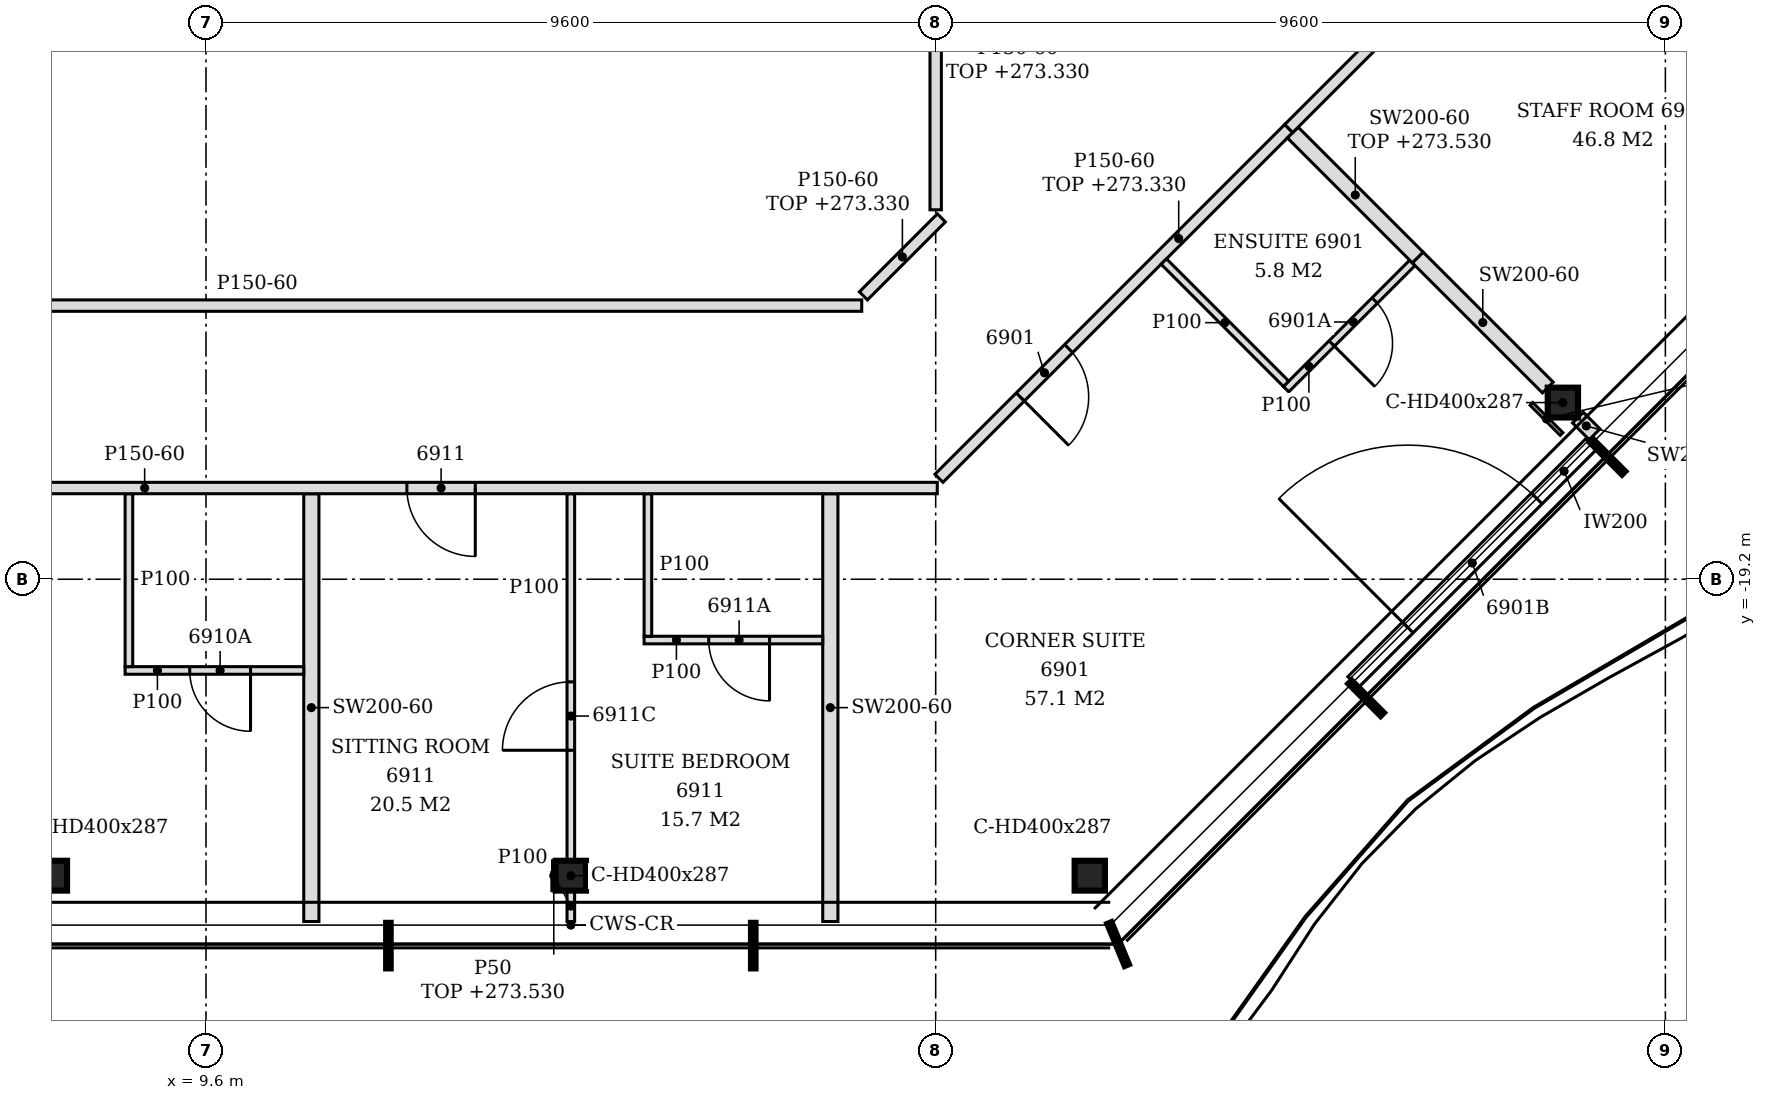
"""IFC4 building model, lengths in metres.
Left out: names, types, materials, properties, quantities, classifications, styles, units other than length and angle.
Written with IfcOpenShell. Run it as: python <this file> out.ifc"""

import sys

from ifc_helpers import new_model, si_unit, direction, frame, frame_2d, origin, origin_2d, place, context, subcontext, project, spatial, polyline, rectangle, i_section, outline, extrude, element, fill, save


model = new_model("IFC4")
c1 = context("Model", 3, precision=1e-05, world=origin(), true_north=direction((0.0, 1.0)))
c2 = subcontext(c1, "Body", "Model", "MODEL_VIEW")
j1 = project(units=[si_unit("LENGTHUNIT", "METRE"), si_unit("PLANEANGLEUNIT", "RADIAN")], contexts=[c1])
p1 = place(None, origin())
s1 = spatial("IfcSite", under=j1, at=p1, CompositionType="ELEMENT")
p2 = place(p1, origin())
s2 = spatial("IfcBuilding", under=s1, at=p2, CompositionType="ELEMENT")
p3 = place(p2, frame((0.0, 0.0, 270.6)))
s3 = spatial("IfcBuildingStorey", under=s2, at=p3, CompositionType="ELEMENT", Elevation=270.6)
for number, where, z_axis, x_axis in (
    (1, (7.573, -23.1, -0.15), (0.0, 0.0, 1.0), (1.0, 0.0, 0.0)),
    (2, (14.4, -23.1, -0.15), (0.0, 0.0, 1.0), (1.0, 0.0, 0.0)),
    (3, (21.227, -23.1, -0.15), (0.0, 0.0, 1.0), (1.0, 0.0, 0.0)),
    (4, (27.451, -16.876, -0.15), (0.0, 0.0, 1.0), (1.0, 0.0, 0.0)),
):
    element("IfcColumn", number, at=place(p3, frame(where, z_axis=z_axis, x_axis=x_axis)), inside=s3, PredefinedType="COLUMN", context=c2, shape_type="SweptSolid", body=[
        extrude(i_section(OverallWidth=0.399, OverallDepth=0.393, WebThickness=0.023, FlangeThickness=0.037, FilletRadius=0.015, at=origin_2d()), origin(), (0.0, 0.0, 1.0), 3.6),
    ])
p4 = place(p3, frame((24.693, -20.553, 0.0), z_axis=(0.0, 0.0, 1.0), x_axis=(0.707079231393, 0.707134329907, 0.0)))
e5 = element("IfcWall", 5, at=p4, inside=s3, PredefinedType="NOTDEFINED", context=c2, shape_type="SweptSolid", body=[
    extrude(rectangle(XDim=4.431, YDim=0.2, at=frame_2d((2.215, 0.0))), origin(), (0.0, 0.0, 1.0), 3.45),
])
p5 = place(p4, frame((1.015, 0.0, 0.0)))
e6 = element("IfcOpeningElement", 6, at=p5, cuts=e5, PredefinedType="OPENING", context=c2, shape_type="SweptSolid", body=[
    extrude(rectangle(XDim=2.4, YDim=2.4, at=frame_2d((1.2, 1.2))), frame((0.0, 0.11, 0.0), z_axis=(0.0, -1.0, 0.0), x_axis=(1.0, 0.0, 0.0)), (0.0, 0.0, 1.0), 0.22),
])
p6 = place(p3, frame((10.986, -23.703, 0.0), z_axis=(0.0, 0.0, 1.0), x_axis=(0.0, 1.0, 0.0)))
e7 = element("IfcWall", 7, at=p6, inside=s3, PredefinedType="PARTITIONING", context=c2, shape_type="SweptSolid", body=[
    extrude(outline(polyline([(0.0, 0.0), (5.628, 0.0), (5.628, 3.45), (4.608, 3.45), (4.606, 2.88), (4.398, 2.88), (4.396, 3.45), (0.753, 3.45), (0.751, 2.93), (0.453, 2.93), (0.451, 3.45), (0.0, 3.45), (0.0, 0.0)])), frame((0.0, 0.1, 0.0), z_axis=(0.0, -1.0, 0.0), x_axis=(1.0, 0.0, 0.0)), (0.0, 0.0, 1.0), 0.2),
])
p7 = place(p3, frame((14.4, -23.703, 0.0), z_axis=(0.0, 0.0, 1.0), x_axis=(0.0, 1.0, 0.0)))
e8 = element("IfcWall", 8, at=p7, inside=s3, PredefinedType="PARTITIONING", context=c2, shape_type="SweptSolid", body=[
    extrude(rectangle(XDim=0.406, YDim=0.1, at=frame_2d((0.203, 0.0))), origin(), (0.0, 0.0, 1.0), 3.45),
])
p8 = place(p3, frame((17.814, -23.703, 0.0), z_axis=(0.0, 0.0, 1.0), x_axis=(0.0, 1.0, 0.0)))
e9 = element("IfcWall", 9, at=p8, inside=s3, PredefinedType="PARTITIONING", context=c2, shape_type="SweptSolid", body=[
    extrude(outline(polyline([(0.0, 0.0), (5.628, 0.0), (5.628, 3.45), (4.608, 3.45), (4.606, 2.88), (4.398, 2.88), (4.396, 3.45), (0.753, 3.45), (0.751, 2.93), (0.453, 2.93), (0.451, 3.45), (0.0, 3.45), (0.0, 0.0)])), frame((0.0, 0.1, 0.0), z_axis=(0.0, -1.0, 0.0), x_axis=(1.0, 0.0, 0.0)), (0.0, 0.0, 1.0), 0.2),
])
p9 = place(p3, frame((14.4, -22.904, 0.0), z_axis=(0.0, 0.0, 1.0), x_axis=(0.0, 1.0, 0.0)))
e10 = element("IfcWall", 10, at=p9, inside=s3, PredefinedType="PARTITIONING", context=c2, shape_type="SweptSolid", body=[
    extrude(outline(polyline([(0.0, 0.0), (4.829, 0.0), (4.829, 3.45), (3.809, 3.45), (3.806, 2.88), (3.598, 2.88), (3.596, 3.45), (0.0, 3.45), (0.0, 0.0)])), frame((0.0, 0.05, 0.0), z_axis=(0.0, -1.0, 0.0), x_axis=(1.0, 0.0, 0.0)), (0.0, 0.0, 1.0), 0.1),
])
p10 = place(p9, frame((1.454, 0.0, 0.0)))
e11 = element("IfcOpeningElement", 11, at=p10, cuts=e10, PredefinedType="OPENING", context=c2, shape_type="SweptSolid", body=[
    extrude(rectangle(XDim=0.9, YDim=2.1, at=frame_2d((0.45, 1.05))), frame((0.0, 0.06, 0.0), z_axis=(0.0, -1.0, 0.0), x_axis=(1.0, 0.0, 0.0)), (0.0, 0.0, 1.0), 0.12),
])
p11 = place(p3, frame((8.536, -20.4, 0.0), z_axis=(0.0, 0.0, 1.0), x_axis=(1.0, 0.0, 0.0)))
e12 = element("IfcWall", 12, at=p11, inside=s3, PredefinedType="PARTITIONING", context=c2, shape_type="SweptSolid", body=[
    extrude(rectangle(XDim=2.35, YDim=0.1, at=frame_2d((1.175, 0.0))), origin(), (0.0, 0.0, 1.0), 3.45),
])
p12 = place(p11, frame((0.85, 0.0, 0.0)))
e13 = element("IfcOpeningElement", 13, at=p12, cuts=e12, PredefinedType="OPENING", context=c2, shape_type="SweptSolid", body=[
    extrude(rectangle(XDim=0.8, YDim=2.1, at=frame_2d((0.4, 1.05))), frame((0.0, 0.06, 0.0), z_axis=(0.0, -1.0, 0.0), x_axis=(1.0, 0.0, 0.0)), (0.0, 0.0, 1.0), 0.12),
])
p13 = place(p3, frame((8.586, -20.35, 0.0), z_axis=(0.0, 0.0, 1.0), x_axis=(0.0, 1.0, 0.0)))
e14 = element("IfcWall", 14, at=p13, inside=s3, PredefinedType="PARTITIONING", context=c2, shape_type="SweptSolid", body=[
    extrude(outline(polyline([(0.0, 0.0), (2.275, 0.0), (2.275, 3.45), (1.255, 3.45), (1.253, 2.88), (1.045, 2.88), (1.043, 3.45), (0.0, 3.45), (0.0, 0.0)])), frame((0.0, 0.05, 0.0), z_axis=(0.0, -1.0, 0.0), x_axis=(1.0, 0.0, 0.0)), (0.0, 0.0, 1.0), 0.1),
])
p14 = place(p3, frame((15.364, -20.0, 0.0), z_axis=(0.0, 0.0, 1.0), x_axis=(1.0, 0.0, 0.0)))
e15 = element("IfcWall", 15, at=p14, inside=s3, PredefinedType="PARTITIONING", context=c2, shape_type="SweptSolid", body=[
    extrude(rectangle(XDim=2.35, YDim=0.1, at=frame_2d((1.175, 0.0))), origin(), (0.0, 0.0, 1.0), 3.45),
])
p15 = place(p14, frame((0.85, 0.0, 0.0)))
e16 = element("IfcOpeningElement", 16, at=p15, cuts=e15, PredefinedType="OPENING", context=c2, shape_type="SweptSolid", body=[
    extrude(rectangle(XDim=0.8, YDim=2.1, at=frame_2d((0.4, 1.05))), frame((0.0, 0.06, 0.0), z_axis=(0.0, -1.0, 0.0), x_axis=(1.0, 0.0, 0.0)), (0.0, 0.0, 1.0), 0.12),
])
p16 = place(p3, frame((15.414, -19.95, 0.0), z_axis=(0.0, 0.0, 1.0), x_axis=(0.0, 1.0, 0.0)))
e17 = element("IfcWall", 17, at=p16, inside=s3, PredefinedType="PARTITIONING", context=c2, shape_type="SweptSolid", body=[
    extrude(outline(polyline([(0.0, 0.0), (1.875, 0.0), (1.875, 3.45), (0.855, 3.45), (0.853, 2.88), (0.645, 2.88), (0.643, 3.45), (0.0, 3.45), (0.0, 0.0)])), frame((0.0, 0.05, 0.0), z_axis=(0.0, -1.0, 0.0), x_axis=(1.0, 0.0, 0.0)), (0.0, 0.0, 1.0), 0.1),
])
p17 = place(p3, frame((1.773, -18.0, 0.0), z_axis=(0.0, 0.0, 1.0), x_axis=(1.0, 0.0, 0.0)))
e18 = element("IfcWall", 18, at=p17, inside=s3, PredefinedType="PARTITIONING", context=c2, shape_type="SweptSolid", body=[
    extrude(outline(polyline([(0.0, 0.0), (17.448, 0.0), (17.448, 2.73), (17.277, 2.73), (17.275, 3.45), (5.577, 3.45), (5.575, 2.73), (5.277, 2.73), (5.275, 3.45), (0.987, 3.45), (0.985, 2.93), (0.413, 2.93), (0.411, 3.45), (0.0, 3.45), (0.0, 0.0)])), frame((0.0, 0.075, 0.0), z_axis=(0.0, -1.0, 0.0), x_axis=(1.0, 0.0, 0.0)), (0.0, 0.0, 1.0), 0.15),
])
p18 = place(p17, frame((2.67, 0.0, 0.0)))
e19 = element("IfcOpeningElement", 19, at=p18, cuts=e18, PredefinedType="OPENING", context=c2, shape_type="SweptSolid", body=[
    extrude(rectangle(XDim=0.9, YDim=2.1, at=frame_2d((0.45, 1.05))), frame((0.0, 0.085, 0.0), z_axis=(0.0, -1.0, 0.0), x_axis=(1.0, 0.0, 0.0)), (0.0, 0.0, 1.0), 0.17),
])
p19 = place(p17, frame((10.47, 0.0, 0.0)))
e20 = element("IfcOpeningElement", 20, at=p19, cuts=e18, PredefinedType="OPENING", context=c2, shape_type="SweptSolid", body=[
    extrude(rectangle(XDim=0.9, YDim=2.1, at=frame_2d((0.45, 1.05))), frame((0.0, 0.085, 0.0), z_axis=(0.0, -1.0, 0.0), x_axis=(1.0, 0.0, 0.0)), (0.0, 0.0, 1.0), 0.17),
])
p20 = place(p3, frame((19.243, -17.872, 0.0), z_axis=(0.0, 0.0, 1.0), x_axis=(0.707106781187, 0.707106781187, 0.0)))
e21 = element("IfcWall", 21, at=p20, inside=s3, PredefinedType="PARTITIONING", context=c2, shape_type="SweptSolid", body=[
    extrude(rectangle(XDim=6.508, YDim=0.15, at=frame_2d((3.254, 0.0))), origin(), (0.0, 0.0, 1.0), 2.73),
])
p21 = place(p20, frame((1.513, 0.0, 0.0)))
e22 = element("IfcOpeningElement", 22, at=p21, cuts=e21, PredefinedType="OPENING", context=c2, shape_type="SweptSolid", body=[
    extrude(rectangle(XDim=0.9, YDim=2.1, at=frame_2d((0.45, 1.05))), frame((0.0, 0.085, 0.0), z_axis=(0.0, -1.0, 0.0), x_axis=(1.0, 0.0, 0.0)), (0.0, 0.0, 1.0), 0.17),
])
p22 = place(p3, frame((27.869, -17.293, 0.0), z_axis=(0.0, 0.0, 1.0), x_axis=(-0.707893766299, 0.706318919211, 0.0)))
e23 = element("IfcWall", 23, at=p22, inside=s3, PredefinedType="PARTITIONING", context=c2, shape_type="SweptSolid", body=[
    extrude(rectangle(XDim=0.31, YDim=0.2, at=frame_2d((0.155, 0.0))), origin(), (0.0, 0.0, 1.0), 3.45),
])
p23 = place(p3, frame((23.81, -16.699, 0.0), z_axis=(0.0, 0.0, 1.0), x_axis=(0.707054835785, 0.707158722772, 0.0)))
e24 = element("IfcWall", 24, at=p23, inside=s3, PredefinedType="PARTITIONING", context=c2, shape_type="SweptSolid", body=[
    extrude(rectangle(XDim=2.35, YDim=0.1, at=frame_2d((1.175, 0.0))), origin(), (0.0, 0.0, 1.0), 3.45),
])
p24 = place(p23, frame((0.85, 0.0, 0.0)))
e25 = element("IfcOpeningElement", 25, at=p24, cuts=e24, PredefinedType="OPENING", context=c2, shape_type="SweptSolid", body=[
    extrude(rectangle(XDim=0.8, YDim=2.1, at=frame_2d((0.4, 1.05))), frame((0.0, 0.06, 0.0), z_axis=(0.0, -1.0, 0.0), x_axis=(1.0, 0.0, 0.0)), (0.0, 0.0, 1.0), 0.12),
])
p25 = place(p3, frame((27.253, -16.678, 0.0), z_axis=(0.0, 0.0, 1.0), x_axis=(-0.707258104101, 0.706955425882, 0.0)))
e26 = element("IfcWall", 26, at=p25, inside=s3, PredefinedType="PARTITIONING", context=c2, shape_type="SweptSolid", body=[
    extrude(rectangle(XDim=2.42, YDim=0.2, at=frame_2d((1.21, 0.0))), origin(), (0.0, 0.0, 1.0), 3.45),
])
p26 = place(p3, frame((23.81, -16.629, 0.0), z_axis=(0.0, 0.0, 1.0), x_axis=(-0.707106781187, 0.707106781187, 0.0)))
e27 = element("IfcWall", 27, at=p26, inside=s3, PredefinedType="PARTITIONING", context=c2, shape_type="SweptSolid", body=[
    extrude(rectangle(XDim=2.275, YDim=0.1, at=frame_2d((1.137, 0.0))), origin(), (0.0, 0.0, 1.0), 3.45),
])
p27 = place(p3, frame((2.325, -15.6, 0.0), z_axis=(0.0, 0.0, 1.0), x_axis=(1.0, 0.0, 0.0)))
e28 = element("IfcWall", 28, at=p27, inside=s3, PredefinedType="PARTITIONING", context=c2, shape_type="SweptSolid", body=[
    extrude(outline(polyline([(0.0, 0.0), (15.902, 0.0), (15.902, 3.45), (5.025, 3.45), (5.023, 2.73), (4.725, 2.73), (4.723, 3.45), (0.0, 3.45), (0.0, 0.0)])), frame((0.0, 0.075, 0.0), z_axis=(0.0, -1.0, 0.0), x_axis=(1.0, 0.0, 0.0)), (0.0, 0.0, 1.0), 0.15),
])
p28 = place(p3, frame((18.249, -15.472, 0.0), z_axis=(0.0, 0.0, 1.0), x_axis=(0.707106781187, 0.707106781187, 0.0)))
e29 = element("IfcWall", 29, at=p28, inside=s3, PredefinedType="PARTITIONING", context=c2, shape_type="SweptSolid", body=[
    extrude(rectangle(XDim=1.451, YDim=0.15, at=frame_2d((0.726, 0.0))), origin(), (0.0, 0.0, 1.0), 2.73),
])
p29 = place(p3, frame((25.542, -14.967, 0.0), z_axis=(0.0, 0.0, 1.0), x_axis=(-0.707106781187, 0.707106781187, 0.0)))
e30 = element("IfcWall", 30, at=p29, inside=s3, PredefinedType="PARTITIONING", context=c2, shape_type="SweptSolid", body=[
    extrude(rectangle(XDim=2.325, YDim=0.2, at=frame_2d((1.163, 0.0))), origin(), (0.0, 0.0, 1.0), 2.93),
])
p30 = place(p3, frame((19.2, -14.34, 0.0), z_axis=(0.0, 0.0, 1.0), x_axis=(0.0, 1.0, 0.0)))
e31 = element("IfcWall", 31, at=p30, inside=s3, PredefinedType="PARTITIONING", context=c2, shape_type="SweptSolid", body=[
    extrude(rectangle(XDim=3.925, YDim=0.15, at=frame_2d((1.962, 0.0))), origin(), (0.0, 0.0, 1.0), 2.73),
])
p31 = place(p3, frame((23.845, -13.27, 0.0), z_axis=(0.0, 0.0, 1.0), x_axis=(0.707044144392, 0.707169412433, 0.0)))
e32 = element("IfcWall", 32, at=p31, inside=s3, PredefinedType="PARTITIONING", context=c2, shape_type="SweptSolid", body=[
    extrude(rectangle(XDim=7.796, YDim=0.15, at=frame_2d((3.898, 0.0))), origin(), (0.0, 0.0, 1.0), 2.88),
])
p32 = place(p31, frame((3.448, 0.0, 0.0)))
e33 = element("IfcOpeningElement", 33, at=p32, cuts=e32, PredefinedType="OPENING", context=c2, shape_type="SweptSolid", body=[
    extrude(rectangle(XDim=0.9, YDim=2.1, at=frame_2d((0.45, 1.05))), frame((0.0, 0.085, 0.0), z_axis=(0.0, -1.0, 0.0), x_axis=(1.0, 0.0, 0.0)), (0.0, 0.0, 1.0), 0.17),
])
p33 = place(p3, frame((14.176, -23.296, 0.0), z_axis=(0.0, 0.0, 1.0), x_axis=(0.0, 1.0, 0.0)))
e34 = element("IfcWall", 34, at=p33, inside=s3, PredefinedType="PARTITIONING", context=c2, shape_type="SweptSolid", body=[
    extrude(rectangle(XDim=0.393, YDim=0.05, at=frame_2d((0.196, 0.0))), origin(), (0.0, 0.0, 1.0), 2.93),
])
p34 = place(p3, frame((27.434, -17.289, 0.0), z_axis=(0.0, 0.0, 1.0), x_axis=(-0.707324788503, 0.706888706636, 0.0)))
e35 = element("IfcWall", 35, at=p34, inside=s3, PredefinedType="PARTITIONING", context=c2, shape_type="SweptSolid", body=[
    extrude(rectangle(XDim=0.56, YDim=0.05, at=frame_2d((0.28, 0.0))), origin(), (0.0, 0.0, 1.0), 2.93),
])
p35 = place(p5, origin())
e36 = element("IfcDoor", 36, at=p35, inside=s3, OperationType="SINGLE_SWING_LEFT", PredefinedType="DOOR", context=c2, shape_type="SweptSolid", body=[
    extrude(rectangle(XDim=2.4, YDim=2.4, at=frame_2d((1.2, 1.2))), frame((0.0, 0.025, 0.0), z_axis=(0.0, -1.0, 0.0), x_axis=(1.0, 0.0, 0.0)), (0.0, 0.0, 1.0), 0.05),
])
fill(e6, e36)
p36 = place(p21, frame((0.9, 0.0, 0.0), z_axis=(0.0, 0.0, 1.0), x_axis=(-1.0, 0.0, 0.0)))
e37 = element("IfcDoor", 37, at=p36, inside=s3, OperationType="SINGLE_SWING_RIGHT", PredefinedType="DOOR", context=c2, shape_type="SweptSolid", body=[
    extrude(rectangle(XDim=0.9, YDim=2.1, at=frame_2d((0.45, 1.05))), frame((0.0, 0.025, 0.0), z_axis=(0.0, -1.0, 0.0), x_axis=(1.0, 0.0, 0.0)), (0.0, 0.0, 1.0), 0.05),
])
fill(e22, e37)
p37 = place(p24, frame((0.8, 0.0, 0.0), z_axis=(0.0, 0.0, 1.0), x_axis=(-1.0, 0.0, 0.0)))
e38 = element("IfcDoor", 38, at=p37, inside=s3, OperationType="SINGLE_SWING_RIGHT", PredefinedType="DOOR", context=c2, shape_type="SweptSolid", body=[
    extrude(rectangle(XDim=0.8, YDim=2.1, at=frame_2d((0.4, 1.05))), frame((0.0, 0.025, 0.0), z_axis=(0.0, -1.0, 0.0), x_axis=(1.0, 0.0, 0.0)), (0.0, 0.0, 1.0), 0.05),
])
fill(e25, e38)
p38 = place(p12, frame((0.8, 0.0, 0.0), z_axis=(0.0, 0.0, 1.0), x_axis=(-1.0, 0.0, 0.0)))
e39 = element("IfcDoor", 39, at=p38, inside=s3, OperationType="SINGLE_SWING_LEFT", PredefinedType="DOOR", context=c2, shape_type="SweptSolid", body=[
    extrude(rectangle(XDim=0.8, YDim=2.1, at=frame_2d((0.4, 1.05))), frame((0.0, 0.025, 0.0), z_axis=(0.0, -1.0, 0.0), x_axis=(1.0, 0.0, 0.0)), (0.0, 0.0, 1.0), 0.05),
])
fill(e13, e39)
p39 = place(p19, frame((0.9, 0.0, 0.0), z_axis=(0.0, 0.0, 1.0), x_axis=(-1.0, 0.0, 0.0)))
e40 = element("IfcDoor", 40, at=p39, inside=s3, OperationType="SINGLE_SWING_LEFT", PredefinedType="DOOR", context=c2, shape_type="SweptSolid", body=[
    extrude(rectangle(XDim=0.9, YDim=2.1, at=frame_2d((0.45, 1.05))), frame((0.0, 0.025, 0.0), z_axis=(0.0, -1.0, 0.0), x_axis=(1.0, 0.0, 0.0)), (0.0, 0.0, 1.0), 0.05),
])
fill(e20, e40)
p40 = place(p10, origin())
e41 = element("IfcDoor", 41, at=p40, inside=s3, OperationType="SINGLE_SWING_LEFT", PredefinedType="DOOR", context=c2, shape_type="SweptSolid", body=[
    extrude(rectangle(XDim=0.9, YDim=2.1, at=frame_2d((0.45, 1.05))), frame((0.0, 0.025, 0.0), z_axis=(0.0, -1.0, 0.0), x_axis=(1.0, 0.0, 0.0)), (0.0, 0.0, 1.0), 0.05),
])
fill(e11, e41)
p41 = place(p15, frame((0.8, 0.0, 0.0), z_axis=(0.0, 0.0, 1.0), x_axis=(-1.0, 0.0, 0.0)))
e42 = element("IfcDoor", 42, at=p41, inside=s3, OperationType="SINGLE_SWING_LEFT", PredefinedType="DOOR", context=c2, shape_type="SweptSolid", body=[
    extrude(rectangle(XDim=0.8, YDim=2.1, at=frame_2d((0.4, 1.05))), frame((0.0, 0.025, 0.0), z_axis=(0.0, -1.0, 0.0), x_axis=(1.0, 0.0, 0.0)), (0.0, 0.0, 1.0), 0.05),
])
fill(e16, e42)
save(model, sys.argv[1])
